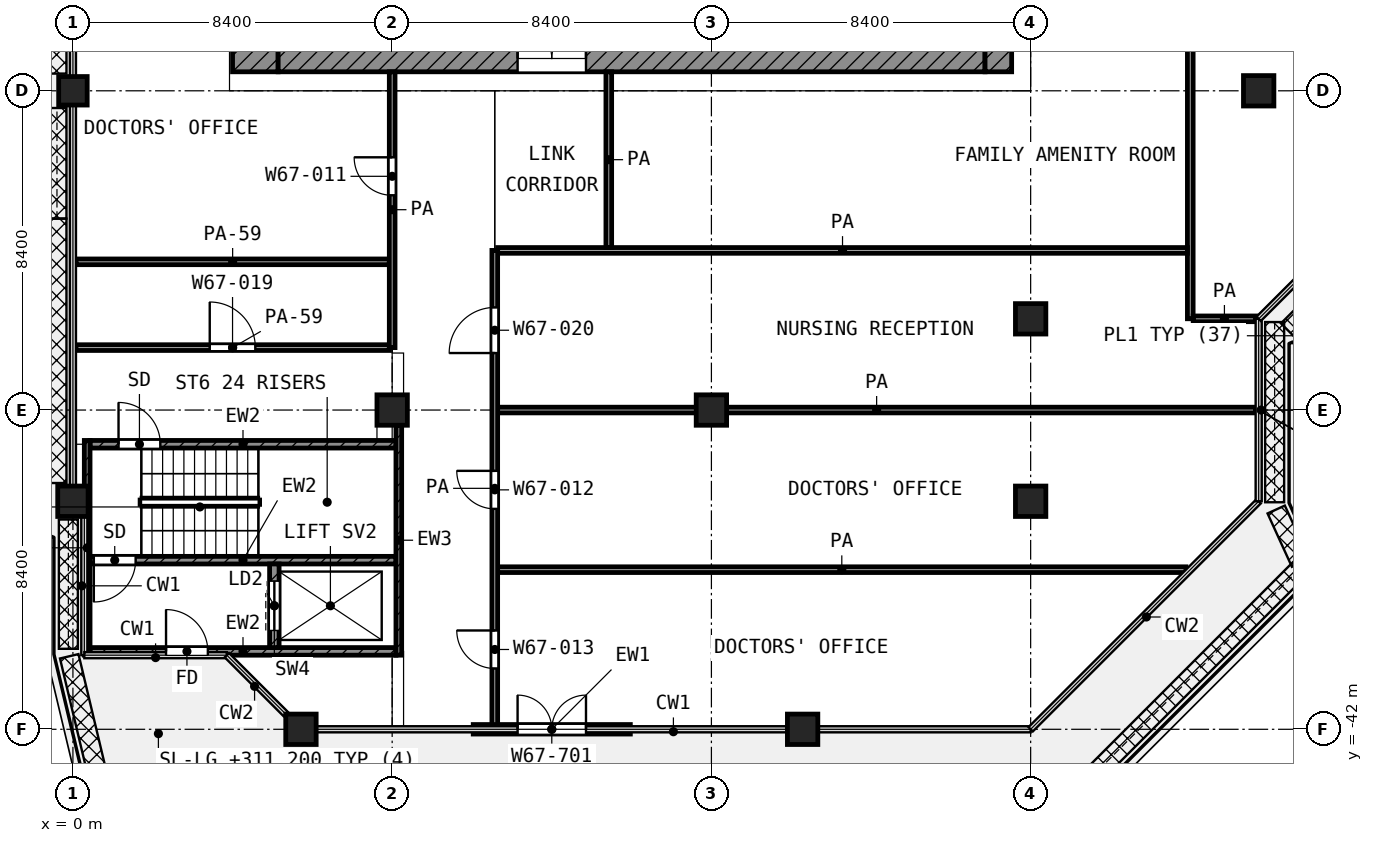
"""IFC4 building model, lengths in metres.
Left out: names, types, materials, properties, quantities, classifications, styles, units other than length and angle.
Written with IfcOpenShell. Run it as: python <this file> out.ifc"""

import sys

from ifc_helpers import new_model, si_unit, direction, frame, frame_2d, origin, origin_2d, place, context, subcontext, project, spatial, rectangle, extrude, element, fill, save


model = new_model("IFC4")
c1 = context("Model", 3, precision=1e-05, world=origin(), true_north=direction((0.0, 1.0)))
c2 = subcontext(c1, "Body", "Model", "MODEL_VIEW")
j1 = project(units=[si_unit("LENGTHUNIT", "METRE"), si_unit("PLANEANGLEUNIT", "RADIAN")], contexts=[c1])
p1 = place(None, origin())
s1 = spatial("IfcSite", under=j1, at=p1, CompositionType="ELEMENT")
p2 = place(p1, origin())
s2 = spatial("IfcBuilding", under=s1, at=p2, CompositionType="ELEMENT")
p3 = place(p2, frame((0.0, 0.0, 311.2)))
s3 = spatial("IfcBuildingStorey", under=s2, at=p3, CompositionType="ELEMENT", Elevation=311.2)
p4 = place(p3, frame((0.0, -25.2, 0.0), z_axis=(0.0, 0.0, 1.0), x_axis=(1.0, 0.0, 0.0)))
e1 = element("IfcColumn", 1, at=p4, inside=s3, PredefinedType="COLUMN", context=c2, shape_type="SweptSolid", body=[
    extrude(rectangle(XDim=0.75, YDim=0.75, at=origin_2d()), origin(), (0.0, 0.0, 1.0), 4.2),
])
for number, where, z_axis, x_axis in (
    (2, (31.2, -25.2, 0.0), (0.0, 0.0, 1.0), (1.0, 0.0, 0.0)),
    (3, (25.2, -31.2, 0.0), (0.0, 0.0, 1.0), (1.0, 0.0, 0.0)),
    (4, (8.4, -33.6, 0.0), (0.0, 0.0, 1.0), (1.0, 0.0, 0.0)),
    (5, (16.8, -33.6, 0.0), (0.0, 0.0, 1.0), (1.0, 0.0, 0.0)),
    (6, (0.0, -36.0, 0.0), (0.0, 0.0, 1.0), (1.0, 0.0, 0.0)),
    (7, (25.2, -36.0, 0.0), (0.0, 0.0, 1.0), (1.0, 0.0, 0.0)),
    (8, (6.0, -42.0, 0.0), (0.0, 0.0, 1.0), (1.0, 0.0, 0.0)),
    (9, (19.2, -42.0, 0.0), (0.0, 0.0, 1.0), (1.0, 0.0, 0.0)),
):
    element("IfcColumn", number, at=place(p3, frame(where, z_axis=z_axis, x_axis=x_axis)), inside=s3, PredefinedType="COLUMN", context=c2, shape_type="SweptSolid", body=[
        extrude(rectangle(XDim=0.8, YDim=0.8, at=origin_2d()), origin(), (0.0, 0.0, 1.0), 4.2),
    ])
p5 = place(p3, frame((10.533, -42.0, 0.0), z_axis=(0.0, 0.0, 1.0), x_axis=(1.0, 0.0, 0.0)))
e10 = element("IfcWall", 10, at=p5, inside=s3, PredefinedType="SOLIDWALL", context=c2, shape_type="SweptSolid", body=[
    extrude(rectangle(XDim=4.133, YDim=0.25, at=frame_2d((2.067, 0.0))), origin(), (0.0, 0.0, 1.0), 3.48),
])
p6 = place(p5, frame((1.167, 0.0, 0.0)))
e11 = element("IfcOpeningElement", 11, at=p6, cuts=e10, PredefinedType="OPENING", context=c2, shape_type="SweptSolid", body=[
    extrude(rectangle(XDim=1.8, YDim=2.1, at=frame_2d((0.9, 1.05))), frame((0.0, 0.135, 0.0), z_axis=(0.0, -1.0, 0.0), x_axis=(1.0, 0.0, 0.0)), (0.0, 0.0, 1.0), 0.27),
])
p7 = place(p3, frame((4.8, -24.7, 0.0), z_axis=(0.0, 0.0, 1.0), x_axis=(0.0, 1.0, 0.0)))
e12 = element("IfcWall", 12, at=p7, inside=s3, PredefinedType="SHEAR", context=c2, shape_type="SweptSolid", body=[
    extrude(rectangle(XDim=19.3, YDim=1.2, at=frame_2d((9.65, 0.0))), origin(), (0.0, 0.0, 1.0), 3.6),
])
p8 = place(p7, frame((11.15, 0.0, 0.0)))
e13 = element("IfcOpeningElement", 13, at=p8, cuts=e12, PredefinedType="OPENING", context=c2, shape_type="SweptSolid", body=[
    extrude(rectangle(XDim=1.1, YDim=2.1, at=frame_2d((0.55, 1.05))), frame((0.0, 0.61, 0.0), z_axis=(0.0, -1.0, 0.0), x_axis=(1.0, 0.0, 0.0)), (0.0, 0.0, 1.0), 1.22),
])
p9 = place(p7, frame((1.85, 0.0, 0.0)))
e14 = element("IfcOpeningElement", 14, at=p9, cuts=e12, PredefinedType="OPENING", context=c2, shape_type="SweptSolid", body=[
    extrude(rectangle(XDim=1.1, YDim=2.1, at=frame_2d((0.55, 1.05))), frame((0.0, 0.61, 0.0), z_axis=(0.0, -1.0, 0.0), x_axis=(1.0, 0.0, 0.0)), (0.0, 0.0, 1.0), 1.22),
])
p10 = place(p3, frame((5.4, -24.35, 0.0), z_axis=(0.0, 0.0, 1.0), x_axis=(1.0, 0.0, 0.0)))
e15 = element("IfcWall", 15, at=p10, inside=s3, PredefinedType="SHEAR", context=c2, shape_type="SweptSolid", body=[
    extrude(rectangle(XDim=18.6, YDim=0.7, at=frame_2d((9.3, 0.0))), origin(), (0.0, 0.0, 1.0), 3.6),
])
p11 = place(p10, frame((6.3, 0.0, 0.0)))
e16 = element("IfcOpeningElement", 16, at=p11, cuts=e15, PredefinedType="OPENING", context=c2, shape_type="SweptSolid", body=[
    extrude(rectangle(XDim=1.8, YDim=2.1, at=frame_2d((0.9, 1.05))), frame((0.0, 0.36, 0.0), z_axis=(0.0, -1.0, 0.0), x_axis=(1.0, 0.0, 0.0)), (0.0, 0.0, 1.0), 0.72),
])
p12 = place(p3, frame((24.35, -24.7, 0.0), z_axis=(0.0, 0.0, 1.0), x_axis=(0.0, 1.0, 0.0)))
e17 = element("IfcWall", 17, at=p12, inside=s3, PredefinedType="SHEAR", context=c2, shape_type="SweptSolid", body=[
    extrude(rectangle(XDim=0.7, YDim=0.7, at=frame_2d((0.35, 0.0))), origin(), (0.0, 0.0, 1.0), 3.6),
])
p13 = place(p3, frame((0.375, -40.05, 0.0), z_axis=(0.0, 0.0, 1.0), x_axis=(0.0, 1.0, 0.0)))
e18 = element("IfcWall", 18, at=p13, inside=s3, PredefinedType="SHEAR", context=c2, shape_type="SweptSolid", body=[
    extrude(rectangle(XDim=5.65, YDim=0.15, at=frame_2d((2.825, 0.0))), origin(), (0.0, 0.0, 1.0), 3.6),
])
p14 = place(p3, frame((8.575, -40.05, 0.0), z_axis=(0.0, 0.0, 1.0), x_axis=(0.0, 1.0, 0.0)))
e19 = element("IfcWall", 19, at=p14, inside=s3, PredefinedType="SHEAR", context=c2, shape_type="SweptSolid", body=[
    extrude(rectangle(XDim=6.05, YDim=0.15, at=frame_2d((3.025, 0.0))), origin(), (0.0, 0.0, 1.0), 3.6),
])
p15 = place(p3, frame((0.45, -34.5, 0.0), z_axis=(0.0, 0.0, 1.0), x_axis=(1.0, 0.0, 0.0)))
e20 = element("IfcWall", 20, at=p15, inside=s3, PredefinedType="SHEAR", context=c2, shape_type="SweptSolid", body=[
    extrude(rectangle(XDim=8.05, YDim=0.2, at=frame_2d((4.025, 0.0))), origin(), (0.0, 0.0, 1.0), 3.6),
])
p16 = place(p15, frame((0.75, 0.0, 0.0)))
e21 = element("IfcOpeningElement", 21, at=p16, cuts=e20, PredefinedType="OPENING", context=c2, shape_type="SweptSolid", body=[
    extrude(rectangle(XDim=1.1, YDim=2.1, at=frame_2d((0.55, 1.05))), frame((0.0, 0.11, 0.0), z_axis=(0.0, -1.0, 0.0), x_axis=(1.0, 0.0, 0.0)), (0.0, 0.0, 1.0), 0.22),
])
p17 = place(p3, frame((0.45, -37.55, 0.0), z_axis=(0.0, 0.0, 1.0), x_axis=(1.0, 0.0, 0.0)))
e22 = element("IfcWall", 22, at=p17, inside=s3, PredefinedType="SHEAR", context=c2, shape_type="SweptSolid", body=[
    extrude(rectangle(XDim=8.05, YDim=0.2, at=frame_2d((4.025, 0.0))), origin(), (0.0, 0.0, 1.0), 3.6),
])
p18 = place(p17, frame((0.1, 0.0, 0.0)))
e23 = element("IfcOpeningElement", 23, at=p18, cuts=e22, PredefinedType="OPENING", context=c2, shape_type="SweptSolid", body=[
    extrude(rectangle(XDim=1.1, YDim=2.1, at=frame_2d((0.55, 1.05))), frame((0.0, 0.11, 0.0), z_axis=(0.0, -1.0, 0.0), x_axis=(1.0, 0.0, 0.0)), (0.0, 0.0, 1.0), 0.22),
])
p19 = place(p3, frame((0.45, -39.95, 0.0), z_axis=(0.0, 0.0, 1.0), x_axis=(1.0, 0.0, 0.0)))
e24 = element("IfcWall", 24, at=p19, inside=s3, PredefinedType="SHEAR", context=c2, shape_type="SweptSolid", body=[
    extrude(rectangle(XDim=8.05, YDim=0.2, at=frame_2d((4.025, 0.0))), origin(), (0.0, 0.0, 1.0), 3.6),
])
p20 = place(p19, frame((2.0, 0.0, 0.0)))
e25 = element("IfcOpeningElement", 25, at=p20, cuts=e24, PredefinedType="OPENING", context=c2, shape_type="SweptSolid", body=[
    extrude(rectangle(XDim=1.1, YDim=2.1, at=frame_2d((0.55, 1.05))), frame((0.0, 0.11, 0.0), z_axis=(0.0, -1.0, 0.0), x_axis=(1.0, 0.0, 0.0)), (0.0, 0.0, 1.0), 0.22),
])
p21 = place(p3, frame((5.3, -39.85, 0.0), z_axis=(0.0, 0.0, 1.0), x_axis=(0.0, 1.0, 0.0)))
e26 = element("IfcWall", 26, at=p21, inside=s3, PredefinedType="SHEAR", context=c2, shape_type="SweptSolid", body=[
    extrude(rectangle(XDim=2.2, YDim=0.25, at=frame_2d((1.1, 0.0))), origin(), (0.0, 0.0, 1.0), 3.6),
])
p22 = place(p21, frame((0.45, 0.0, 0.0)))
e27 = element("IfcOpeningElement", 27, at=p22, cuts=e26, PredefinedType="OPENING", context=c2, shape_type="SweptSolid", body=[
    extrude(rectangle(XDim=1.3, YDim=2.1, at=frame_2d((0.65, 1.05))), frame((0.0, 0.135, 0.0), z_axis=(0.0, -1.0, 0.0), x_axis=(1.0, 0.0, 0.0)), (0.0, 0.0, 1.0), 0.27),
])
p23 = place(p3, frame((11.175, -37.8, 0.0), z_axis=(0.0, 0.0, 1.0), x_axis=(1.0, 0.0, 0.0)))
e28 = element("IfcWall", 28, at=p23, inside=s3, PredefinedType="PARTITIONING", context=c2, shape_type="SweptSolid", body=[
    extrude(rectangle(XDim=18.112, YDim=0.15, at=frame_2d((9.056, 0.0))), origin(), (0.0, 0.0, 1.0), 3.6),
])
p24 = place(p3, frame((11.175, -33.6, 0.0), z_axis=(0.0, 0.0, 1.0), x_axis=(1.0, 0.0, 0.0)))
e29 = element("IfcWall", 29, at=p24, inside=s3, PredefinedType="PARTITIONING", context=c2, shape_type="SweptSolid", body=[
    extrude(rectangle(XDim=19.945, YDim=0.15, at=frame_2d((9.973, 0.0))), origin(), (0.0, 0.0, 1.0), 3.6),
])
p25 = place(p3, frame((0.08, -31.957, 0.0), z_axis=(0.0, 0.0, 1.0), x_axis=(1.0, 0.0, 0.0)))
e30 = element("IfcWall", 30, at=p25, inside=s3, PredefinedType="PARTITIONING", context=c2, shape_type="SweptSolid", body=[
    extrude(rectangle(XDim=8.245, YDim=0.15, at=frame_2d((4.123, 0.0))), origin(), (0.0, 0.0, 1.0), 2.7),
])
p26 = place(p25, frame((3.52, 0.0, 0.0)))
e31 = element("IfcOpeningElement", 31, at=p26, cuts=e30, PredefinedType="OPENING", context=c2, shape_type="SweptSolid", body=[
    extrude(rectangle(XDim=1.2, YDim=2.1, at=frame_2d((0.6, 1.05))), frame((0.0, 0.085, 0.0), z_axis=(0.0, -1.0, 0.0), x_axis=(1.0, 0.0, 0.0)), (0.0, 0.0, 1.0), 0.17),
])
p27 = place(p3, frame((29.477, -31.2, 0.0), z_axis=(0.0, 0.0, 1.0), x_axis=(1.0, 0.0, 0.0)))
e32 = element("IfcWall", 32, at=p27, inside=s3, PredefinedType="PARTITIONING", context=c2, shape_type="SweptSolid", body=[
    extrude(rectangle(XDim=1.643, YDim=0.15, at=frame_2d((0.822, 0.0))), origin(), (0.0, 0.0, 1.0), 3.6),
])
p28 = place(p3, frame((0.08, -29.7, 0.0), z_axis=(0.0, 0.0, 1.0), x_axis=(1.0, 0.0, 0.0)))
e33 = element("IfcWall", 33, at=p28, inside=s3, PredefinedType="PARTITIONING", context=c2, shape_type="SweptSolid", body=[
    extrude(rectangle(XDim=8.245, YDim=0.15, at=frame_2d((4.123, 0.0))), origin(), (0.0, 0.0, 1.0), 2.7),
])
p29 = place(p3, frame((11.175, -29.4, 0.0), z_axis=(0.0, 0.0, 1.0), x_axis=(1.0, 0.0, 0.0)))
e34 = element("IfcWall", 34, at=p29, inside=s3, PredefinedType="PARTITIONING", context=c2, shape_type="SweptSolid", body=[
    extrude(rectangle(XDim=18.15, YDim=0.15, at=frame_2d((9.075, 0.0))), origin(), (0.0, 0.0, 1.0), 3.6),
])
p30 = place(p3, frame((8.4, -31.957, 0.0), z_axis=(0.0, 0.0, 1.0), x_axis=(0.0, 1.0, 0.0)))
e35 = element("IfcWall", 35, at=p30, inside=s3, PredefinedType="PARTITIONING", context=c2, shape_type="SweptSolid", body=[
    extrude(rectangle(XDim=7.257, YDim=0.15, at=frame_2d((3.628, 0.0))), origin(), (0.0, 0.0, 1.0), 3.6),
])
p31 = place(p30, frame((4.007, 0.0, 0.0)))
e36 = element("IfcOpeningElement", 36, at=p31, cuts=e35, PredefinedType="OPENING", context=c2, shape_type="SweptSolid", body=[
    extrude(rectangle(XDim=1.0, YDim=2.1, at=frame_2d((0.5, 1.05))), frame((0.0, 0.085, 0.0), z_axis=(0.0, -1.0, 0.0), x_axis=(1.0, 0.0, 0.0)), (0.0, 0.0, 1.0), 0.17),
])
p32 = place(p3, frame((11.1, -41.92, 0.0), z_axis=(0.0, 0.0, 1.0), x_axis=(0.0, 1.0, 0.0)))
e37 = element("IfcWall", 37, at=p32, inside=s3, PredefinedType="PARTITIONING", context=c2, shape_type="SweptSolid", body=[
    extrude(rectangle(XDim=12.52, YDim=0.15, at=frame_2d((6.26, 0.0))), origin(), (0.0, 0.0, 1.0), 3.6),
])
p33 = place(p32, frame((9.82, 0.0, 0.0)))
e38 = element("IfcOpeningElement", 38, at=p33, cuts=e37, PredefinedType="OPENING", context=c2, shape_type="SweptSolid", body=[
    extrude(rectangle(XDim=1.2, YDim=2.1, at=frame_2d((0.6, 1.05))), frame((0.0, 0.085, 0.0), z_axis=(0.0, -1.0, 0.0), x_axis=(1.0, 0.0, 0.0)), (0.0, 0.0, 1.0), 0.17),
])
p34 = place(p32, frame((5.72, 0.0, 0.0)))
e39 = element("IfcOpeningElement", 39, at=p34, cuts=e37, PredefinedType="OPENING", context=c2, shape_type="SweptSolid", body=[
    extrude(rectangle(XDim=1.0, YDim=2.1, at=frame_2d((0.5, 1.05))), frame((0.0, 0.085, 0.0), z_axis=(0.0, -1.0, 0.0), x_axis=(1.0, 0.0, 0.0)), (0.0, 0.0, 1.0), 0.17),
])
p35 = place(p32, frame((1.52, 0.0, 0.0)))
e40 = element("IfcOpeningElement", 40, at=p35, cuts=e37, PredefinedType="OPENING", context=c2, shape_type="SweptSolid", body=[
    extrude(rectangle(XDim=1.0, YDim=2.1, at=frame_2d((0.5, 1.05))), frame((0.0, 0.085, 0.0), z_axis=(0.0, -1.0, 0.0), x_axis=(1.0, 0.0, 0.0)), (0.0, 0.0, 1.0), 0.17),
])
p36 = place(p3, frame((14.1, -29.325, 0.0), z_axis=(0.0, 0.0, 1.0), x_axis=(0.0, 1.0, 0.0)))
e41 = element("IfcWall", 41, at=p36, inside=s3, PredefinedType="PARTITIONING", context=c2, shape_type="SweptSolid", body=[
    extrude(rectangle(XDim=4.625, YDim=0.15, at=frame_2d((2.312, 0.0))), origin(), (0.0, 0.0, 1.0), 3.6),
])
p37 = place(p3, frame((29.4, -31.198, 0.0), z_axis=(0.0, 0.0, 1.0), x_axis=(0.0, 1.0, 0.0)))
e42 = element("IfcWall", 42, at=p37, inside=s3, PredefinedType="PARTITIONING", context=c2, shape_type="SweptSolid", body=[
    extrude(rectangle(XDim=20.098, YDim=0.15, at=frame_2d((10.049, 0.0))), origin(), (0.0, 0.0, 1.0), 3.6),
])
p38 = place(p6, origin())
e43 = element("IfcDoor", 43, at=p38, inside=s3, OperationType="DOUBLE_DOOR_SINGLE_SWING", PredefinedType="DOOR", context=c2, shape_type="SweptSolid", body=[
    extrude(rectangle(XDim=1.8, YDim=2.1, at=frame_2d((0.9, 1.05))), frame((0.0, 0.025, 0.0), z_axis=(0.0, -1.0, 0.0), x_axis=(1.0, 0.0, 0.0)), (0.0, 0.0, 1.0), 0.05),
])
fill(e11, e43)
p39 = place(p11, origin())
e44 = element("IfcDoor", 44, at=p39, inside=s3, OperationType="DOUBLE_DOOR_SINGLE_SWING", PredefinedType="DOOR", context=c2, shape_type="SweptSolid", body=[
    extrude(rectangle(XDim=1.8, YDim=2.1, at=frame_2d((0.9, 1.05))), frame((0.0, 0.025, 0.0), z_axis=(0.0, -1.0, 0.0), x_axis=(1.0, 0.0, 0.0)), (0.0, 0.0, 1.0), 0.05),
])
fill(e16, e44)
p40 = place(p16, origin())
e45 = element("IfcDoor", 45, at=p40, inside=s3, OperationType="SINGLE_SWING_LEFT", PredefinedType="DOOR", context=c2, shape_type="SweptSolid", body=[
    extrude(rectangle(XDim=1.1, YDim=2.1, at=frame_2d((0.55, 1.05))), frame((0.0, 0.025, 0.0), z_axis=(0.0, -1.0, 0.0), x_axis=(1.0, 0.0, 0.0)), (0.0, 0.0, 1.0), 0.05),
])
fill(e21, e45)
p41 = place(p18, frame((1.1, 0.0, 0.0), z_axis=(0.0, 0.0, 1.0), x_axis=(-1.0, 0.0, 0.0)))
e46 = element("IfcDoor", 46, at=p41, inside=s3, OperationType="SINGLE_SWING_LEFT", PredefinedType="DOOR", context=c2, shape_type="SweptSolid", body=[
    extrude(rectangle(XDim=1.1, YDim=2.1, at=frame_2d((0.55, 1.05))), frame((0.0, 0.025, 0.0), z_axis=(0.0, -1.0, 0.0), x_axis=(1.0, 0.0, 0.0)), (0.0, 0.0, 1.0), 0.05),
])
fill(e23, e46)
p42 = place(p22, origin())
e47 = element("IfcDoor", 47, at=p42, inside=s3, OperationType="DOUBLE_DOOR_SLIDING", PredefinedType="DOOR", context=c2, shape_type="SweptSolid", body=[
    extrude(rectangle(XDim=1.3, YDim=2.1, at=frame_2d((0.65, 1.05))), frame((0.0, 0.025, 0.0), z_axis=(0.0, -1.0, 0.0), x_axis=(1.0, 0.0, 0.0)), (0.0, 0.0, 1.0), 0.05),
])
fill(e27, e47)
p43 = place(p20, origin())
e48 = element("IfcDoor", 48, at=p43, inside=s3, OperationType="SINGLE_SWING_LEFT", PredefinedType="DOOR", context=c2, shape_type="SweptSolid", body=[
    extrude(rectangle(XDim=1.1, YDim=2.1, at=frame_2d((0.55, 1.05))), frame((0.0, 0.025, 0.0), z_axis=(0.0, -1.0, 0.0), x_axis=(1.0, 0.0, 0.0)), (0.0, 0.0, 1.0), 0.05),
])
fill(e25, e48)
p44 = place(p31, origin())
e49 = element("IfcDoor", 49, at=p44, inside=s3, OperationType="SINGLE_SWING_RIGHT", PredefinedType="DOOR", context=c2, shape_type="SweptSolid", body=[
    extrude(rectangle(XDim=1.0, YDim=2.1, at=frame_2d((0.5, 1.05))), frame((0.0, 0.025, 0.0), z_axis=(0.0, -1.0, 0.0), x_axis=(1.0, 0.0, 0.0)), (0.0, 0.0, 1.0), 0.05),
])
fill(e36, e49)
p45 = place(p26, origin())
e50 = element("IfcDoor", 50, at=p45, inside=s3, OperationType="SINGLE_SWING_LEFT", PredefinedType="DOOR", context=c2, shape_type="SweptSolid", body=[
    extrude(rectangle(XDim=1.2, YDim=2.1, at=frame_2d((0.6, 1.05))), frame((0.0, 0.025, 0.0), z_axis=(0.0, -1.0, 0.0), x_axis=(1.0, 0.0, 0.0)), (0.0, 0.0, 1.0), 0.05),
])
fill(e31, e50)
p46 = place(p33, origin())
e51 = element("IfcDoor", 51, at=p46, inside=s3, OperationType="SINGLE_SWING_LEFT", PredefinedType="DOOR", context=c2, shape_type="SweptSolid", body=[
    extrude(rectangle(XDim=1.2, YDim=2.1, at=frame_2d((0.6, 1.05))), frame((0.0, 0.025, 0.0), z_axis=(0.0, -1.0, 0.0), x_axis=(1.0, 0.0, 0.0)), (0.0, 0.0, 1.0), 0.05),
])
fill(e38, e51)
p47 = place(p34, origin())
e52 = element("IfcDoor", 52, at=p47, inside=s3, OperationType="SINGLE_SWING_RIGHT", PredefinedType="DOOR", context=c2, shape_type="SweptSolid", body=[
    extrude(rectangle(XDim=1.0, YDim=2.1, at=frame_2d((0.5, 1.05))), frame((0.0, 0.025, 0.0), z_axis=(0.0, -1.0, 0.0), x_axis=(1.0, 0.0, 0.0)), (0.0, 0.0, 1.0), 0.05),
])
fill(e39, e52)
p48 = place(p35, origin())
e53 = element("IfcDoor", 53, at=p48, inside=s3, OperationType="SINGLE_SWING_RIGHT", PredefinedType="DOOR", context=c2, shape_type="SweptSolid", body=[
    extrude(rectangle(XDim=1.0, YDim=2.1, at=frame_2d((0.5, 1.05))), frame((0.0, 0.025, 0.0), z_axis=(0.0, -1.0, 0.0), x_axis=(1.0, 0.0, 0.0)), (0.0, 0.0, 1.0), 0.05),
])
fill(e40, e53)
save(model, sys.argv[1])
